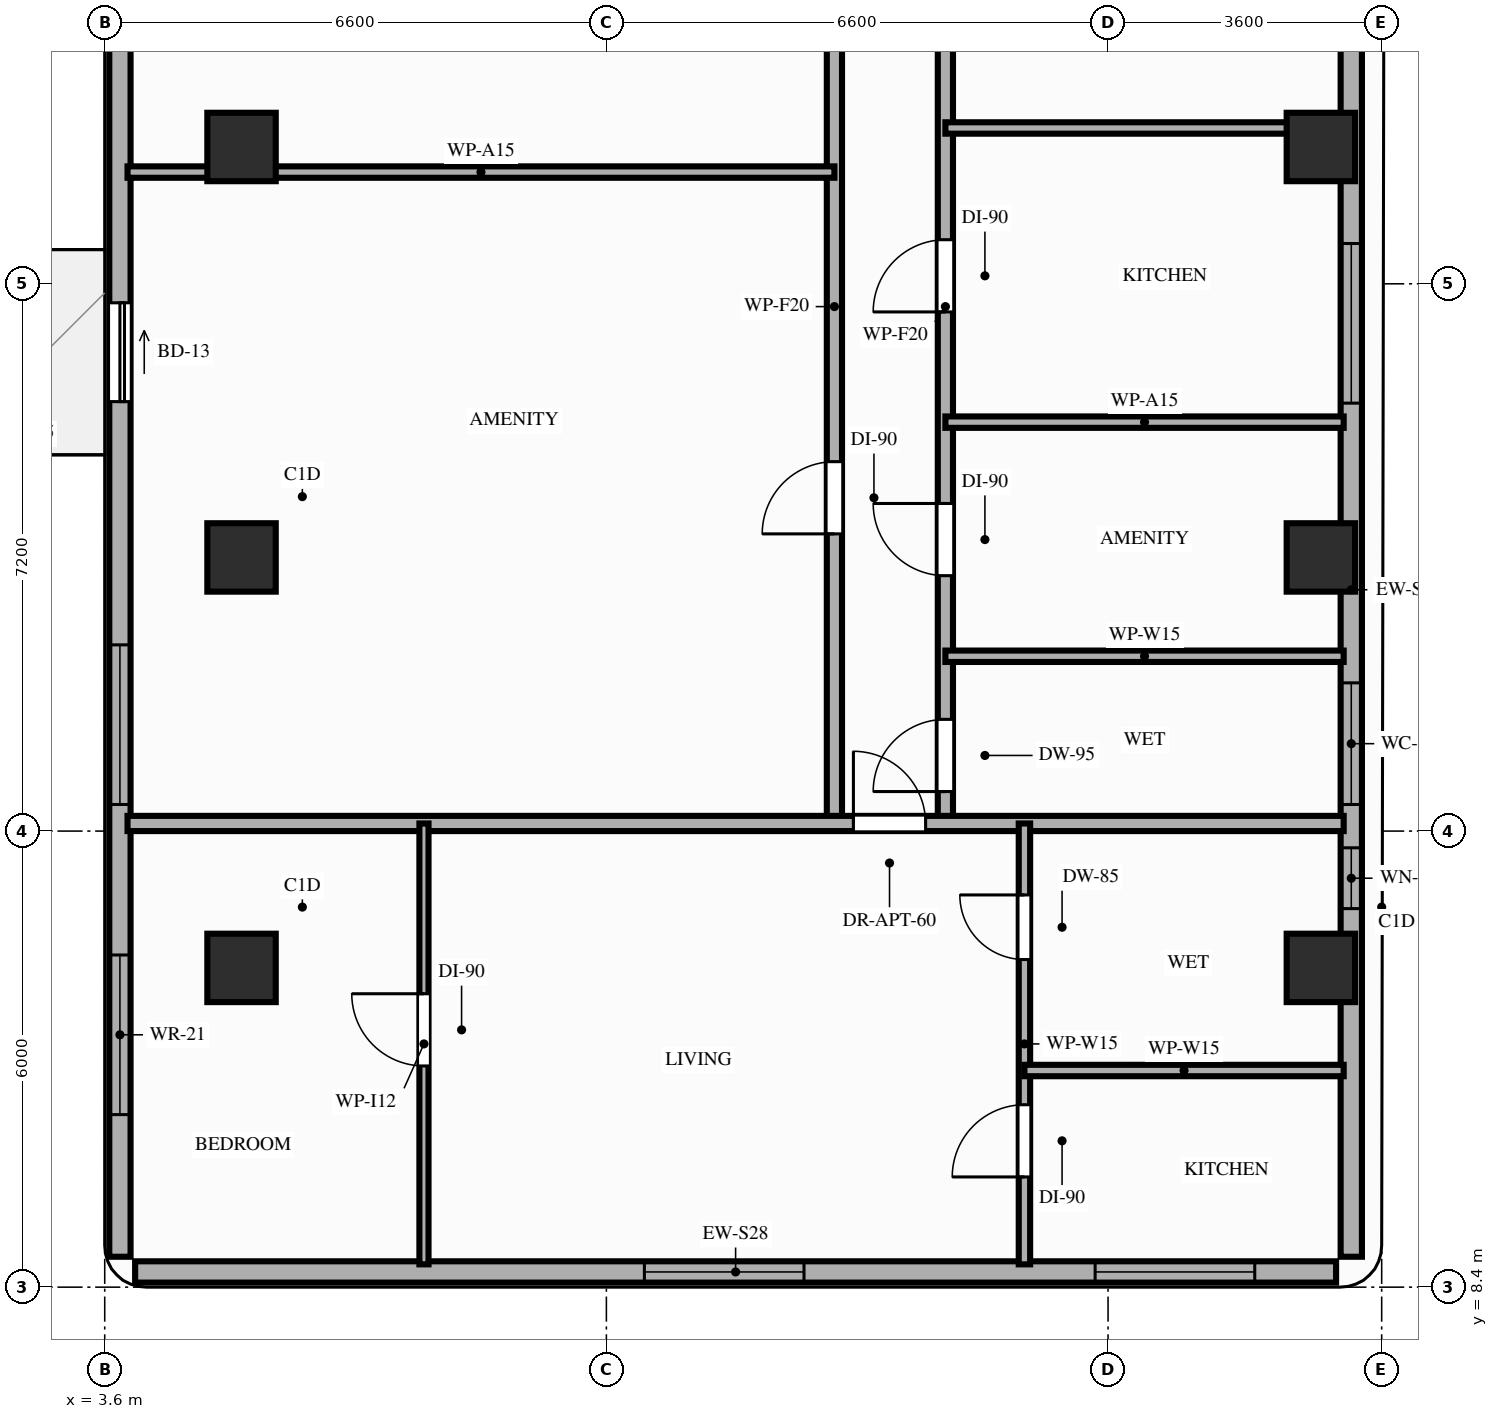
"""IFC4 building model, lengths in metres.
Left out: names, types, materials, properties, quantities, classifications, styles, units other than length and angle.
Written with IfcOpenShell. Run it as: python <this file> out.ifc"""

import sys

from ifc_helpers import new_model, si_unit, direction, frame, frame_2d, origin, origin_2d, place, context, subcontext, project, spatial, rectangle, extrude, element, fill, save


model = new_model("IFC4")
c1 = context("Model", 3, precision=1e-05, world=origin(), true_north=direction((0.0, 1.0)))
c2 = subcontext(c1, "Body", "Model", "MODEL_VIEW")
j1 = project(units=[si_unit("LENGTHUNIT", "METRE"), si_unit("PLANEANGLEUNIT", "RADIAN")], contexts=[c1])
p1 = place(None, origin())
s1 = spatial("IfcSite", under=j1, at=p1, CompositionType="ELEMENT")
p2 = place(p1, origin())
s2 = spatial("IfcBuilding", under=s1, at=p2, CompositionType="ELEMENT")
p3 = place(p2, frame((0.0, 0.0, 201.6)))
s3 = spatial("IfcBuildingStorey", under=s2, at=p3, CompositionType="ELEMENT", Elevation=201.6)
for number, where, z_axis, x_axis in (
    (1, (5.4, 12.6, 0.0), (0.0, 0.0, 1.0), (1.0, 0.0, 0.0)),
    (2, (19.6, 12.6, 0.0), (0.0, 0.0, 1.0), (1.0, 0.0, 0.0)),
    (3, (5.4, 18.0, 0.0), (0.0, 0.0, 1.0), (1.0, 0.0, 0.0)),
    (4, (19.6, 18.0, 0.0), (0.0, 0.0, 1.0), (1.0, 0.0, 0.0)),
    (5, (5.4, 23.4, 0.0), (0.0, 0.0, 1.0), (1.0, 0.0, 0.0)),
    (6, (19.6, 23.4, 0.0), (0.0, 0.0, 1.0), (1.0, 0.0, 0.0)),
):
    element("IfcColumn", number, at=place(p3, frame(where, z_axis=z_axis, x_axis=x_axis)), inside=s3, PredefinedType="COLUMN", context=c2, shape_type="SweptSolid", body=[
        extrude(rectangle(XDim=0.9, YDim=0.9, at=origin_2d()), origin(), (0.0, 0.0, 1.0), 3.2),
    ])
p4 = place(p3, frame((4.0, 8.6, 0.0), z_axis=(0.0, 0.0, 1.0), x_axis=(1.0, 0.0, 0.0)))
e7 = element("IfcWall", 7, at=p4, inside=s3, PredefinedType="STANDARD", context=c2, shape_type="SweptSolid", body=[
    extrude(rectangle(XDim=15.8, YDim=0.28, at=frame_2d((7.9, 0.0))), origin(), (0.0, 0.0, 1.0), 3.02),
])
p5 = place(p4, frame((6.7, 0.0, 0.85)))
e8 = element("IfcOpeningElement", 8, at=p5, cuts=e7, PredefinedType="OPENING", context=c2, shape_type="SweptSolid", body=[
    extrude(rectangle(XDim=2.1, YDim=1.8, at=frame_2d((1.05, 0.9))), frame((0.0, 0.15, 0.0), z_axis=(0.0, -1.0, 0.0), x_axis=(1.0, 0.0, 0.0)), (0.0, 0.0, 1.0), 0.3),
])
p6 = place(p4, frame((12.63, 0.0, 0.85)))
e9 = element("IfcOpeningElement", 9, at=p6, cuts=e7, PredefinedType="OPENING", context=c2, shape_type="SweptSolid", body=[
    extrude(rectangle(XDim=2.1, YDim=1.8, at=frame_2d((1.05, 0.9))), frame((0.0, 0.15, 0.0), z_axis=(0.0, -1.0, 0.0), x_axis=(1.0, 0.0, 0.0)), (0.0, 0.0, 1.0), 0.3),
])
p7 = place(p3, frame((3.8, 42.1, 0.0), z_axis=(0.0, 0.0, 1.0), x_axis=(0.0, -1.0, 0.0)))
e10 = element("IfcWall", 10, at=p7, inside=s3, PredefinedType="STANDARD", context=c2, shape_type="SweptSolid", body=[
    extrude(rectangle(XDim=33.3, YDim=0.28, at=frame_2d((16.65, 0.0))), origin(), (0.0, 0.0, 1.0), 2.71),
])
p8 = place(p7, frame((20.75, 0.0, 0.0)))
e11 = element("IfcOpeningElement", 11, at=p8, cuts=e10, PredefinedType="OPENING", context=c2, shape_type="SweptSolid", body=[
    extrude(rectangle(XDim=1.3, YDim=2.08, at=frame_2d((0.65, 1.04))), frame((0.0, 0.15, 0.0), z_axis=(0.0, -1.0, 0.0), x_axis=(1.0, 0.0, 0.0)), (0.0, 0.0, 1.0), 0.3),
])
p9 = place(p7, frame((29.33, 0.0, 0.85)))
e12 = element("IfcOpeningElement", 12, at=p9, cuts=e10, PredefinedType="OPENING", context=c2, shape_type="SweptSolid", body=[
    extrude(rectangle(XDim=2.1, YDim=1.61, at=frame_2d((1.05, 0.805))), frame((0.0, 0.15, 0.0), z_axis=(0.0, -1.0, 0.0), x_axis=(1.0, 0.0, 0.0)), (0.0, 0.0, 1.0), 0.3),
])
p10 = place(p7, frame((25.25, 0.0, 0.85)))
e13 = element("IfcOpeningElement", 13, at=p10, cuts=e10, PredefinedType="OPENING", context=c2, shape_type="SweptSolid", body=[
    extrude(rectangle(XDim=2.1, YDim=1.61, at=frame_2d((1.05, 0.805))), frame((0.0, 0.15, 0.0), z_axis=(0.0, -1.0, 0.0), x_axis=(1.0, 0.0, 0.0)), (0.0, 0.0, 1.0), 0.3),
])
p11 = place(p7, frame((14.95, 0.0, 0.85)))
e14 = element("IfcOpeningElement", 14, at=p11, cuts=e10, PredefinedType="OPENING", context=c2, shape_type="SweptSolid", body=[
    extrude(rectangle(XDim=2.1, YDim=1.61, at=frame_2d((1.05, 0.805))), frame((0.0, 0.15, 0.0), z_axis=(0.0, -1.0, 0.0), x_axis=(1.0, 0.0, 0.0)), (0.0, 0.0, 1.0), 0.3),
])
p12 = place(p7, frame((9.75, 0.0, 0.85)))
e15 = element("IfcOpeningElement", 15, at=p12, cuts=e10, PredefinedType="OPENING", context=c2, shape_type="SweptSolid", body=[
    extrude(rectangle(XDim=2.1, YDim=1.61, at=frame_2d((1.05, 0.805))), frame((0.0, 0.15, 0.0), z_axis=(0.0, -1.0, 0.0), x_axis=(1.0, 0.0, 0.0)), (0.0, 0.0, 1.0), 0.3),
])
p13 = place(p7, frame((3.65, 0.0, 0.85)))
e16 = element("IfcOpeningElement", 16, at=p13, cuts=e10, PredefinedType="OPENING", context=c2, shape_type="SweptSolid", body=[
    extrude(rectangle(XDim=2.1, YDim=1.61, at=frame_2d((1.05, 0.805))), frame((0.0, 0.15, 0.0), z_axis=(0.0, -1.0, 0.0), x_axis=(1.0, 0.0, 0.0)), (0.0, 0.0, 1.0), 0.3),
])
p14 = place(p3, frame((20.0, 8.8, 0.0), z_axis=(0.0, 0.0, 1.0), x_axis=(0.0, 1.0, 0.0)))
e17 = element("IfcWall", 17, at=p14, inside=s3, PredefinedType="STANDARD", context=c2, shape_type="SweptSolid", body=[
    extrude(rectangle(XDim=17.55, YDim=0.28, at=frame_2d((8.775, 0.0))), origin(), (0.0, 0.0, 1.0), 2.51),
])
p15 = place(p14, frame((4.58, 0.0, 0.85)))
e18 = element("IfcOpeningElement", 18, at=p15, cuts=e17, PredefinedType="OPENING", context=c2, shape_type="SweptSolid", body=[
    extrude(rectangle(XDim=0.8, YDim=1.41, at=frame_2d((0.4, 0.705))), frame((0.0, 0.15, 0.0), z_axis=(0.0, -1.0, 0.0), x_axis=(1.0, 0.0, 0.0)), (0.0, 0.0, 1.0), 0.3),
])
p16 = place(p14, frame((5.95, 0.0, 0.85)))
e19 = element("IfcOpeningElement", 19, at=p16, cuts=e17, PredefinedType="OPENING", context=c2, shape_type="SweptSolid", body=[
    extrude(rectangle(XDim=1.6, YDim=1.41, at=frame_2d((0.8, 0.705))), frame((0.0, 0.15, 0.0), z_axis=(0.0, -1.0, 0.0), x_axis=(1.0, 0.0, 0.0)), (0.0, 0.0, 1.0), 0.3),
])
p17 = place(p14, frame((11.23, 0.0, 0.85)))
e20 = element("IfcOpeningElement", 20, at=p17, cuts=e17, PredefinedType="OPENING", context=c2, shape_type="SweptSolid", body=[
    extrude(rectangle(XDim=2.1, YDim=1.41, at=frame_2d((1.05, 0.705))), frame((0.0, 0.15, 0.0), z_axis=(0.0, -1.0, 0.0), x_axis=(1.0, 0.0, 0.0)), (0.0, 0.0, 1.0), 0.3),
])
p18 = place(p3, frame((13.2, 14.5, 0.0), z_axis=(0.0, 0.0, 1.0), x_axis=(0.0, 1.0, 0.0)))
e21 = element("IfcWall", 21, at=p18, inside=s3, PredefinedType="PARTITIONING", context=c2, shape_type="SweptSolid", body=[
    extrude(rectangle(XDim=13.6, YDim=0.2, at=frame_2d((6.8, 0.0))), origin(), (0.0, 0.0, 1.0), 2.51),
])
p19 = place(p18, frame((3.81, 0.0, 0.0)))
e22 = element("IfcOpeningElement", 22, at=p19, cuts=e21, PredefinedType="OPENING", context=c2, shape_type="SweptSolid", body=[
    extrude(rectangle(XDim=0.95, YDim=2.15, at=frame_2d((0.475, 1.075))), frame((0.0, 0.11, 0.0), z_axis=(0.0, -1.0, 0.0), x_axis=(1.0, 0.0, 0.0)), (0.0, 0.0, 1.0), 0.22),
])
p20 = place(p18, frame((10.61, 0.0, 0.0)))
e23 = element("IfcOpeningElement", 23, at=p20, cuts=e21, PredefinedType="OPENING", context=c2, shape_type="SweptSolid", body=[
    extrude(rectangle(XDim=0.95, YDim=2.15, at=frame_2d((0.475, 1.075))), frame((0.0, 0.11, 0.0), z_axis=(0.0, -1.0, 0.0), x_axis=(1.0, 0.0, 0.0)), (0.0, 0.0, 1.0), 0.22),
])
p21 = place(p3, frame((14.66, 14.5, 0.0), z_axis=(0.0, 0.0, 1.0), x_axis=(0.0, 1.0, 0.0)))
e24 = element("IfcWall", 24, at=p21, inside=s3, PredefinedType="PARTITIONING", context=c2, shape_type="SweptSolid", body=[
    extrude(rectangle(XDim=13.6, YDim=0.2, at=frame_2d((6.8, 0.0))), origin(), (0.0, 0.0, 1.0), 2.51),
])
p22 = place(p21, frame((0.42, 0.0, 0.0)))
e25 = element("IfcOpeningElement", 25, at=p22, cuts=e24, PredefinedType="OPENING", context=c2, shape_type="SweptSolid", body=[
    extrude(rectangle(XDim=0.95, YDim=2.1, at=frame_2d((0.475, 1.05))), frame((0.0, 0.11, 0.0), z_axis=(0.0, -1.0, 0.0), x_axis=(1.0, 0.0, 0.0)), (0.0, 0.0, 1.0), 0.22),
])
p23 = place(p21, frame((3.26, 0.0, 0.0)))
e26 = element("IfcOpeningElement", 26, at=p23, cuts=e24, PredefinedType="OPENING", context=c2, shape_type="SweptSolid", body=[
    extrude(rectangle(XDim=0.95, YDim=2.15, at=frame_2d((0.475, 1.075))), frame((0.0, 0.11, 0.0), z_axis=(0.0, -1.0, 0.0), x_axis=(1.0, 0.0, 0.0)), (0.0, 0.0, 1.0), 0.22),
])
p24 = place(p21, frame((6.73, 0.0, 0.0)))
e27 = element("IfcOpeningElement", 27, at=p24, cuts=e24, PredefinedType="OPENING", context=c2, shape_type="SweptSolid", body=[
    extrude(rectangle(XDim=0.95, YDim=2.15, at=frame_2d((0.475, 1.075))), frame((0.0, 0.11, 0.0), z_axis=(0.0, -1.0, 0.0), x_axis=(1.0, 0.0, 0.0)), (0.0, 0.0, 1.0), 0.22),
])
p25 = place(p21, frame((10.89, 0.0, 0.0)))
e28 = element("IfcOpeningElement", 28, at=p25, cuts=e24, PredefinedType="OPENING", context=c2, shape_type="SweptSolid", body=[
    extrude(rectangle(XDim=0.95, YDim=2.15, at=frame_2d((0.475, 1.075))), frame((0.0, 0.11, 0.0), z_axis=(0.0, -1.0, 0.0), x_axis=(1.0, 0.0, 0.0)), (0.0, 0.0, 1.0), 0.22),
])
p26 = place(p3, frame((3.9, 14.5, 0.0), z_axis=(0.0, 0.0, 1.0), x_axis=(1.0, 0.0, 0.0)))
e29 = element("IfcWall", 29, at=p26, inside=s3, PredefinedType="PARTITIONING", context=c2, shape_type="SweptSolid", body=[
    extrude(rectangle(XDim=16.0, YDim=0.2, at=frame_2d((8.0, 0.0))), origin(), (0.0, 0.0, 1.0), 2.51),
])
p27 = place(p26, frame((9.55, 0.0, 0.0)))
e30 = element("IfcOpeningElement", 30, at=p27, cuts=e29, PredefinedType="OPENING", context=c2, shape_type="SweptSolid", body=[
    extrude(rectangle(XDim=0.95, YDim=2.15, at=frame_2d((0.475, 1.075))), frame((0.0, 0.11, 0.0), z_axis=(0.0, -1.0, 0.0), x_axis=(1.0, 0.0, 0.0)), (0.0, 0.0, 1.0), 0.22),
])
p28 = place(p3, frame((7.8, 8.7, 0.0), z_axis=(0.0, 0.0, 1.0), x_axis=(0.0, 1.0, 0.0)))
e31 = element("IfcWall", 31, at=p28, inside=s3, PredefinedType="PARTITIONING", context=c2, shape_type="SweptSolid", body=[
    extrude(rectangle(XDim=5.8, YDim=0.12, at=frame_2d((2.9, 0.0))), origin(), (0.0, 0.0, 1.0), 2.51),
])
p29 = place(p28, frame((2.61, 0.0, 0.0)))
e32 = element("IfcOpeningElement", 32, at=p29, cuts=e31, PredefinedType="OPENING", context=c2, shape_type="SweptSolid", body=[
    extrude(rectangle(XDim=0.95, YDim=2.15, at=frame_2d((0.475, 1.075))), frame((0.0, 0.07, 0.0), z_axis=(0.0, -1.0, 0.0), x_axis=(1.0, 0.0, 0.0)), (0.0, 0.0, 1.0), 0.14),
])
p30 = place(p3, frame((15.7, 8.7, 0.0), z_axis=(0.0, 0.0, 1.0), x_axis=(0.0, 1.0, 0.0)))
e33 = element("IfcWall", 33, at=p30, inside=s3, PredefinedType="PARTITIONING", context=c2, shape_type="SweptSolid", body=[
    extrude(rectangle(XDim=5.8, YDim=0.15, at=frame_2d((2.9, 0.0))), origin(), (0.0, 0.0, 1.0), 2.51),
])
p31 = place(p30, frame((1.15, 0.0, 0.0)))
e34 = element("IfcOpeningElement", 34, at=p31, cuts=e33, PredefinedType="OPENING", context=c2, shape_type="SweptSolid", body=[
    extrude(rectangle(XDim=0.95, YDim=2.15, at=frame_2d((0.475, 1.075))), frame((0.0, 0.085, 0.0), z_axis=(0.0, -1.0, 0.0), x_axis=(1.0, 0.0, 0.0)), (0.0, 0.0, 1.0), 0.17),
])
p32 = place(p30, frame((4.01, 0.0, 0.0)))
e35 = element("IfcOpeningElement", 35, at=p32, cuts=e33, PredefinedType="OPENING", context=c2, shape_type="SweptSolid", body=[
    extrude(rectangle(XDim=0.85, YDim=2.1, at=frame_2d((0.425, 1.05))), frame((0.0, 0.085, 0.0), z_axis=(0.0, -1.0, 0.0), x_axis=(1.0, 0.0, 0.0)), (0.0, 0.0, 1.0), 0.17),
])
p33 = place(p3, frame((15.7, 11.25, 0.0), z_axis=(0.0, 0.0, 1.0), x_axis=(1.0, 0.0, 0.0)))
e36 = element("IfcWall", 36, at=p33, inside=s3, PredefinedType="PARTITIONING", context=c2, shape_type="SweptSolid", body=[
    extrude(rectangle(XDim=4.2, YDim=0.15, at=frame_2d((2.1, 0.0))), origin(), (0.0, 0.0, 1.0), 3.02),
])
p34 = place(p3, frame((3.9, 23.07, 0.0), z_axis=(0.0, 0.0, 1.0), x_axis=(1.0, 0.0, 0.0)))
e37 = element("IfcWall", 37, at=p34, inside=s3, PredefinedType="PARTITIONING", context=c2, shape_type="SweptSolid", body=[
    extrude(rectangle(XDim=9.3, YDim=0.15, at=frame_2d((4.65, 0.0))), origin(), (0.0, 0.0, 1.0), 2.51),
])
for number, where, z_axis, x_axis in (
    (38, (14.66, 16.7, 0.0), (0.0, 0.0, 1.0), (1.0, 0.0, 0.0)),
    (39, (14.66, 19.78, 0.0), (0.0, 0.0, 1.0), (1.0, 0.0, 0.0)),
    (40, (14.66, 23.65, 0.0), (0.0, 0.0, 1.0), (1.0, 0.0, 0.0)),
):
    element("IfcWall", number, at=place(p3, frame(where, z_axis=z_axis, x_axis=x_axis)), inside=s3, PredefinedType="PARTITIONING", context=c2, shape_type="SweptSolid", body=[
        extrude(rectangle(XDim=5.24, YDim=0.15, at=frame_2d((2.62, 0.0))), origin(), (0.0, 0.0, 1.0), 2.51),
    ])
p35 = place(p8, origin())
e41 = element("IfcDoor", 41, at=p35, inside=s3, OperationType="SLIDING_TO_LEFT", PredefinedType="DOOR", context=c2, shape_type="SweptSolid", body=[
    extrude(rectangle(XDim=1.3, YDim=2.08, at=frame_2d((0.65, 1.04))), frame((0.0, 0.025, 0.0), z_axis=(0.0, -1.0, 0.0), x_axis=(1.0, 0.0, 0.0)), (0.0, 0.0, 1.0), 0.05),
])
fill(e11, e41)
p36 = place(p9, origin())
e42 = element("IfcWindow", 42, at=p36, inside=s3, PartitioningType="SINGLE_PANEL", PredefinedType="WINDOW", context=c2, shape_type="SweptSolid", body=[
    extrude(rectangle(XDim=2.1, YDim=1.61, at=frame_2d((1.05, 0.805))), frame((0.0, 0.03, 0.0), z_axis=(0.0, -1.0, 0.0), x_axis=(1.0, 0.0, 0.0)), (0.0, 0.0, 1.0), 0.06),
])
fill(e12, e42)
p37 = place(p5, origin())
e43 = element("IfcWindow", 43, at=p37, inside=s3, PartitioningType="SINGLE_PANEL", PredefinedType="WINDOW", context=c2, shape_type="SweptSolid", body=[
    extrude(rectangle(XDim=2.1, YDim=1.8, at=frame_2d((1.05, 0.9))), frame((0.0, 0.03, 0.0), z_axis=(0.0, -1.0, 0.0), x_axis=(1.0, 0.0, 0.0)), (0.0, 0.0, 1.0), 0.06),
])
fill(e8, e43)
p38 = place(p6, origin())
e44 = element("IfcWindow", 44, at=p38, inside=s3, PartitioningType="SINGLE_PANEL", PredefinedType="WINDOW", context=c2, shape_type="SweptSolid", body=[
    extrude(rectangle(XDim=2.1, YDim=1.8, at=frame_2d((1.05, 0.9))), frame((0.0, 0.03, 0.0), z_axis=(0.0, -1.0, 0.0), x_axis=(1.0, 0.0, 0.0)), (0.0, 0.0, 1.0), 0.06),
])
fill(e9, e44)
p39 = place(p15, origin())
e45 = element("IfcWindow", 45, at=p39, inside=s3, PartitioningType="SINGLE_PANEL", PredefinedType="WINDOW", context=c2, shape_type="SweptSolid", body=[
    extrude(rectangle(XDim=0.8, YDim=1.41, at=frame_2d((0.4, 0.705))), frame((0.0, 0.03, 0.0), z_axis=(0.0, -1.0, 0.0), x_axis=(1.0, 0.0, 0.0)), (0.0, 0.0, 1.0), 0.06),
])
fill(e18, e45)
p40 = place(p10, origin())
e46 = element("IfcWindow", 46, at=p40, inside=s3, PartitioningType="SINGLE_PANEL", PredefinedType="WINDOW", context=c2, shape_type="SweptSolid", body=[
    extrude(rectangle(XDim=2.1, YDim=1.61, at=frame_2d((1.05, 0.805))), frame((0.0, 0.03, 0.0), z_axis=(0.0, -1.0, 0.0), x_axis=(1.0, 0.0, 0.0)), (0.0, 0.0, 1.0), 0.06),
])
fill(e13, e46)
p41 = place(p16, origin())
e47 = element("IfcWindow", 47, at=p41, inside=s3, PartitioningType="SINGLE_PANEL", PredefinedType="WINDOW", context=c2, shape_type="SweptSolid", body=[
    extrude(rectangle(XDim=1.6, YDim=1.41, at=frame_2d((0.8, 0.705))), frame((0.0, 0.03, 0.0), z_axis=(0.0, -1.0, 0.0), x_axis=(1.0, 0.0, 0.0)), (0.0, 0.0, 1.0), 0.06),
])
fill(e19, e47)
p42 = place(p17, origin())
e48 = element("IfcWindow", 48, at=p42, inside=s3, PartitioningType="SINGLE_PANEL", PredefinedType="WINDOW", context=c2, shape_type="SweptSolid", body=[
    extrude(rectangle(XDim=2.1, YDim=1.41, at=frame_2d((1.05, 0.705))), frame((0.0, 0.03, 0.0), z_axis=(0.0, -1.0, 0.0), x_axis=(1.0, 0.0, 0.0)), (0.0, 0.0, 1.0), 0.06),
])
fill(e20, e48)
p43 = place(p27, origin())
e49 = element("IfcDoor", 49, at=p43, inside=s3, OperationType="SINGLE_SWING_LEFT", PredefinedType="DOOR", context=c2, shape_type="SweptSolid", body=[
    extrude(rectangle(XDim=0.95, YDim=2.15, at=frame_2d((0.475, 1.075))), frame((0.0, 0.025, 0.0), z_axis=(0.0, -1.0, 0.0), x_axis=(1.0, 0.0, 0.0)), (0.0, 0.0, 1.0), 0.05),
])
fill(e30, e49)
p44 = place(p29, origin())
e50 = element("IfcDoor", 50, at=p44, inside=s3, OperationType="SINGLE_SWING_RIGHT", PredefinedType="DOOR", context=c2, shape_type="SweptSolid", body=[
    extrude(rectangle(XDim=0.95, YDim=2.15, at=frame_2d((0.475, 1.075))), frame((0.0, 0.025, 0.0), z_axis=(0.0, -1.0, 0.0), x_axis=(1.0, 0.0, 0.0)), (0.0, 0.0, 1.0), 0.05),
])
fill(e32, e50)
p45 = place(p31, origin())
e51 = element("IfcDoor", 51, at=p45, inside=s3, OperationType="SINGLE_SWING_LEFT", PredefinedType="DOOR", context=c2, shape_type="SweptSolid", body=[
    extrude(rectangle(XDim=0.95, YDim=2.15, at=frame_2d((0.475, 1.075))), frame((0.0, 0.025, 0.0), z_axis=(0.0, -1.0, 0.0), x_axis=(1.0, 0.0, 0.0)), (0.0, 0.0, 1.0), 0.05),
])
fill(e34, e51)
p46 = place(p32, origin())
e52 = element("IfcDoor", 52, at=p46, inside=s3, OperationType="SINGLE_SWING_RIGHT", PredefinedType="DOOR", context=c2, shape_type="SweptSolid", body=[
    extrude(rectangle(XDim=0.85, YDim=2.1, at=frame_2d((0.425, 1.05))), frame((0.0, 0.025, 0.0), z_axis=(0.0, -1.0, 0.0), x_axis=(1.0, 0.0, 0.0)), (0.0, 0.0, 1.0), 0.05),
])
fill(e35, e52)
p47 = place(p19, origin())
e53 = element("IfcDoor", 53, at=p47, inside=s3, OperationType="SINGLE_SWING_LEFT", PredefinedType="DOOR", context=c2, shape_type="SweptSolid", body=[
    extrude(rectangle(XDim=0.95, YDim=2.15, at=frame_2d((0.475, 1.075))), frame((0.0, 0.025, 0.0), z_axis=(0.0, -1.0, 0.0), x_axis=(1.0, 0.0, 0.0)), (0.0, 0.0, 1.0), 0.05),
])
fill(e22, e53)
p48 = place(p22, origin())
e54 = element("IfcDoor", 54, at=p48, inside=s3, OperationType="SINGLE_SWING_LEFT", PredefinedType="DOOR", context=c2, shape_type="SweptSolid", body=[
    extrude(rectangle(XDim=0.95, YDim=2.1, at=frame_2d((0.475, 1.05))), frame((0.0, 0.025, 0.0), z_axis=(0.0, -1.0, 0.0), x_axis=(1.0, 0.0, 0.0)), (0.0, 0.0, 1.0), 0.05),
])
fill(e25, e54)
p49 = place(p23, origin())
e55 = element("IfcDoor", 55, at=p49, inside=s3, OperationType="SINGLE_SWING_RIGHT", PredefinedType="DOOR", context=c2, shape_type="SweptSolid", body=[
    extrude(rectangle(XDim=0.95, YDim=2.15, at=frame_2d((0.475, 1.075))), frame((0.0, 0.025, 0.0), z_axis=(0.0, -1.0, 0.0), x_axis=(1.0, 0.0, 0.0)), (0.0, 0.0, 1.0), 0.05),
])
fill(e26, e55)
p50 = place(p24, origin())
e56 = element("IfcDoor", 56, at=p50, inside=s3, OperationType="SINGLE_SWING_LEFT", PredefinedType="DOOR", context=c2, shape_type="SweptSolid", body=[
    extrude(rectangle(XDim=0.95, YDim=2.15, at=frame_2d((0.475, 1.075))), frame((0.0, 0.025, 0.0), z_axis=(0.0, -1.0, 0.0), x_axis=(1.0, 0.0, 0.0)), (0.0, 0.0, 1.0), 0.05),
])
fill(e27, e56)
save(model, sys.argv[1])
